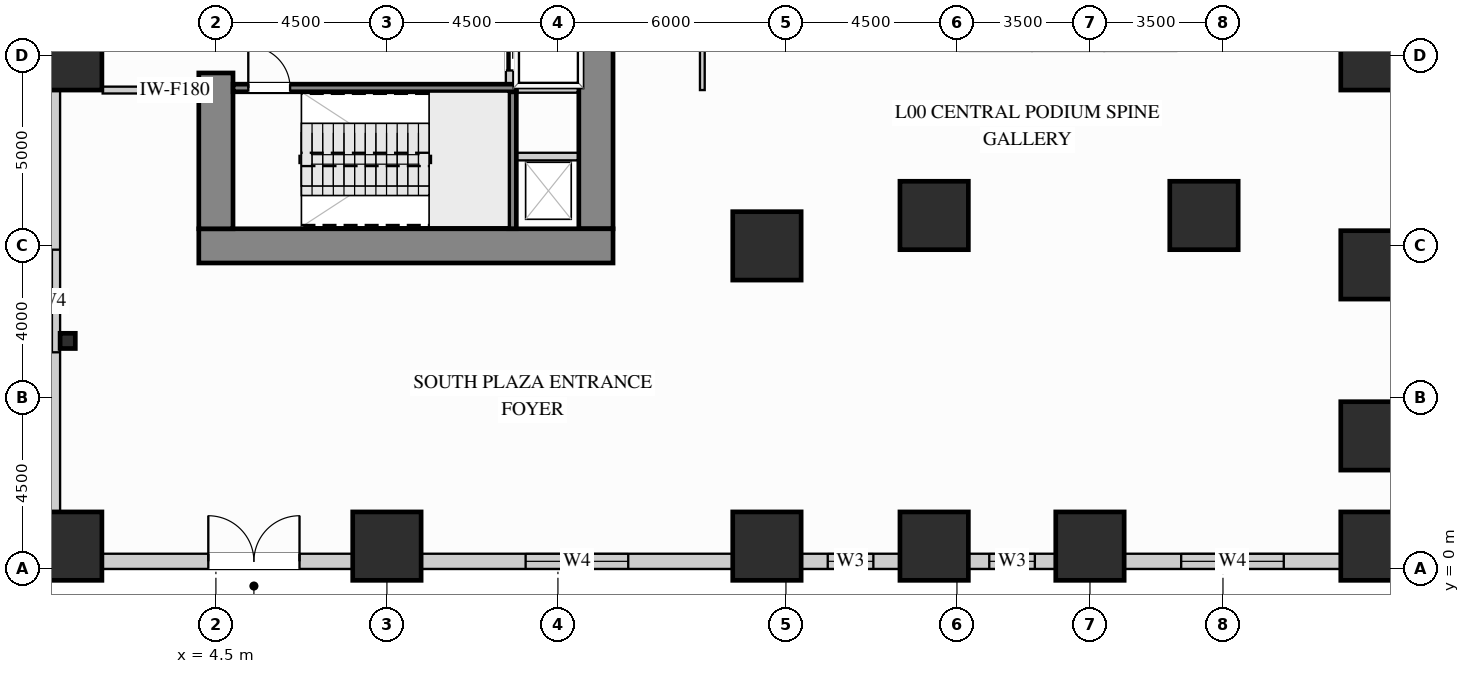
"""IFC4 building model, lengths in metres.
Left out: names, types, materials, properties, quantities, classifications, styles, units other than length and angle.
Written with IfcOpenShell. Run it as: python <this file> out.ifc"""

import sys

from ifc_helpers import new_model, si_unit, direction, frame, frame_2d, origin, origin_2d, place, context, subcontext, project, spatial, rectangle, hollow_rectangle, extrude, source, transform, mapped, element, fill, save


model = new_model("IFC4")
c1 = context("Model", 3, precision=1e-05, world=origin(), true_north=direction((0.0, 1.0)))
c2 = subcontext(c1, "Body", "Model", "MODEL_VIEW")
j1 = project(units=[si_unit("LENGTHUNIT", "METRE"), si_unit("PLANEANGLEUNIT", "RADIAN")], contexts=[c1])
p1 = place(None, origin())
s1 = spatial("IfcSite", under=j1, at=p1, CompositionType="ELEMENT")
p2 = place(p1, origin())
s2 = spatial("IfcBuilding", under=s1, at=p2, CompositionType="ELEMENT")
p3 = place(p2, origin())
s3 = spatial("IfcBuildingStorey", under=s2, at=p3, CompositionType="ELEMENT", Elevation=0.0)
m1 = source(origin(), c2, "Body", "SweptSolid", [
    extrude(rectangle(XDim=1.8, YDim=1.8, at=origin_2d()), origin(), (0.0, 0.0, 1.0), 4.25),
])
for number, where, z_axis, x_axis in (
    (1, (0.6, 0.6, 0.0), (0.0, 0.0, 1.0), (1.0, 0.0, 0.0)),
    (2, (0.6, 13.5, 0.0), (0.0, 0.0, 1.0), (1.0, 0.0, 0.0)),
    (3, (9.0, 0.6, 0.0), (0.0, 0.0, 1.0), (1.0, 0.0, 0.0)),
    (4, (19.0, 0.6, 0.0), (0.0, 0.0, 1.0), (1.0, 0.0, 0.0)),
    (5, (27.5, 0.6, 0.0), (0.0, 0.0, 1.0), (1.0, 0.0, 0.0)),
    (6, (35.0, 0.6, 0.0), (0.0, 0.0, 1.0), (1.0, 0.0, 0.0)),
    (7, (19.0, 8.5, 0.0), (0.0, 0.0, 1.0), (1.0, 0.0, 0.0)),
    (8, (35.0, 3.5, 0.0), (0.0, 0.0, 1.0), (1.0, 0.0, 0.0)),
    (9, (35.0, 8.0, 0.0), (0.0, 0.0, 1.0), (1.0, 0.0, 0.0)),
    (10, (35.0, 13.5, 0.0), (0.0, 0.0, 1.0), (1.0, 0.0, 0.0)),
    (11, (23.4, 0.6, 0.0), (0.0, 0.0, 1.0), (1.0, 0.0, 0.0)),
    (12, (23.4, 9.3, 0.0), (0.0, 0.0, 1.0), (1.0, 0.0, 0.0)),
    (13, (30.5, 9.3, 0.0), (0.0, 0.0, 1.0), (1.0, 0.0, 0.0)),
):
    element("IfcColumn", number, at=place(p3, frame(where, z_axis=z_axis, x_axis=x_axis)), inside=s3, PredefinedType="COLUMN", context=c2, shape_type="MappedRepresentation", body=[
        mapped(m1, transform((0.0, 0.0, 0.0), x_axis=(1.0, 0.0, 0.0), y_axis=(0.0, 1.0, 0.0), z_axis=(0.0, 0.0, 1.0))),
    ])
m2 = source(origin(), c2, "Body", "SweptSolid", [
    extrude(hollow_rectangle(XDim=0.4, YDim=0.4, WallThickness=0.02, at=origin_2d()), origin(), (0.0, 0.0, 1.0), 4.25),
])
p4 = place(p3, frame((0.6, 6.0, 0.0), z_axis=(0.0, 0.0, 1.0), x_axis=(1.0, 0.0, 0.0)))
e14 = element("IfcColumn", 14, at=p4, inside=s3, PredefinedType="PILASTER", context=c2, shape_type="MappedRepresentation", body=[
    mapped(m2, transform((0.0, 0.0, 0.0), x_axis=(1.0, 0.0, 0.0), y_axis=(0.0, 1.0, 0.0), z_axis=(0.0, 0.0, 1.0))),
])
m3 = source(origin(), c2, "Body", "SweptSolid", [
    extrude(rectangle(XDim=9.87, YDim=0.9, at=frame_2d((4.935, 0.0))), origin(), (0.0, 0.0, 1.0), 4.25),
])
p5 = place(p3, frame((14.5, 8.95, 0.0), z_axis=(0.0, 0.0, 1.0), x_axis=(0.0, 1.0, 0.0)))
e15 = element("IfcWall", 15, at=p5, inside=s3, PredefinedType="SHEAR", context=c2, shape_type="MappedRepresentation", body=[
    mapped(m3, transform((0.0, 0.0, 0.0), x_axis=(1.0, 0.0, 0.0), y_axis=(0.0, 1.0, 0.0), z_axis=(0.0, 0.0, 1.0))),
])
m4 = source(origin(), c2, "Body", "SweptSolid", [
    extrude(rectangle(XDim=10.9, YDim=0.9, at=frame_2d((5.45, 0.0))), origin(), (0.0, 0.0, 1.0), 4.25),
])
p6 = place(p3, frame((4.05, 8.5, 0.0), z_axis=(0.0, 0.0, 1.0), x_axis=(1.0, 0.0, 0.0)))
e16 = element("IfcWall", 16, at=p6, inside=s3, PredefinedType="SHEAR", context=c2, shape_type="MappedRepresentation", body=[
    mapped(m4, transform((0.0, 0.0, 0.0), x_axis=(1.0, 0.0, 0.0), y_axis=(0.0, 1.0, 0.0), z_axis=(0.0, 0.0, 1.0))),
])
m5 = source(origin(), c2, "Body", "SweptSolid", [
    extrude(rectangle(XDim=4.1, YDim=0.9, at=frame_2d((2.05, 0.0))), origin(), (0.0, 0.0, 1.0), 4.25),
])
p7 = place(p3, frame((4.5, 8.95, 0.0), z_axis=(0.0, 0.0, 1.0), x_axis=(0.0, 1.0, 0.0)))
e17 = element("IfcWall", 17, at=p7, inside=s3, PredefinedType="SHEAR", context=c2, shape_type="MappedRepresentation", body=[
    mapped(m5, transform((0.0, 0.0, 0.0), x_axis=(1.0, 0.0, 0.0), y_axis=(0.0, 1.0, 0.0), z_axis=(0.0, 0.0, 1.0))),
])
p8 = place(p3, frame((0.2, 12.602, 0.0), z_axis=(0.0, 0.0, 1.0), x_axis=(0.0, -1.0, 0.0)))
e18 = element("IfcWall", 18, at=p8, inside=s3, PredefinedType="SOLIDWALL", context=c2, shape_type="SweptSolid", body=[
    extrude(rectangle(XDim=11.104, YDim=0.4, at=frame_2d((5.552, 0.0))), origin(), (0.0, 0.0, 1.0), 3.135),
])
p9 = place(p8, frame((4.202, 0.0, 0.65)))
e19 = element("IfcOpeningElement", 19, at=p9, cuts=e18, PredefinedType="OPENING", context=c2, shape_type="SweptSolid", body=[
    extrude(rectangle(XDim=2.7, YDim=2.305, at=frame_2d((1.35, 1.152))), frame((0.0, 0.21, 0.0), z_axis=(0.0, -1.0, 0.0), x_axis=(1.0, 0.0, 0.0)), (0.0, 0.0, 1.0), 0.42),
])
p10 = place(p3, frame((1.498, 0.2, 0.0), z_axis=(0.0, 0.0, 1.0), x_axis=(1.0, 0.0, 0.0)))
e20 = element("IfcWall", 20, at=p10, inside=s3, PredefinedType="SOLIDWALL", context=c2, shape_type="SweptSolid", body=[
    extrude(rectangle(XDim=6.604, YDim=0.4, at=frame_2d((3.302, 0.0))), origin(), (0.0, 0.0, 1.0), 3.135),
])
p11 = place(p10, frame((2.802, 0.0, 0.0)))
e21 = element("IfcOpeningElement", 21, at=p11, cuts=e20, PredefinedType="OPENING", context=c2, shape_type="SweptSolid", body=[
    extrude(rectangle(XDim=2.4, YDim=2.6, at=frame_2d((1.2, 1.3))), frame((0.0, 0.21, 0.0), z_axis=(0.0, -1.0, 0.0), x_axis=(1.0, 0.0, 0.0)), (0.0, 0.0, 1.0), 0.42),
])
p12 = place(p3, frame((9.898, 0.2, 0.0), z_axis=(0.0, 0.0, 1.0), x_axis=(1.0, 0.0, 0.0)))
e22 = element("IfcWall", 22, at=p12, inside=s3, PredefinedType="SOLIDWALL", context=c2, shape_type="SweptSolid", body=[
    extrude(rectangle(XDim=8.204, YDim=0.4, at=frame_2d((4.102, 0.0))), origin(), (0.0, 0.0, 1.0), 3.135),
])
p13 = place(p12, frame((2.752, 0.0, 0.65)))
e23 = element("IfcOpeningElement", 23, at=p13, cuts=e22, PredefinedType="OPENING", context=c2, shape_type="SweptSolid", body=[
    extrude(rectangle(XDim=2.7, YDim=2.305, at=frame_2d((1.35, 1.152))), frame((0.0, 0.21, 0.0), z_axis=(0.0, -1.0, 0.0), x_axis=(1.0, 0.0, 0.0)), (0.0, 0.0, 1.0), 0.42),
])
p14 = place(p3, frame((19.898, 0.2, 0.0), z_axis=(0.0, 0.0, 1.0), x_axis=(1.0, 0.0, 0.0)))
e24 = element("IfcWall", 24, at=p14, inside=s3, PredefinedType="SOLIDWALL", context=c2, shape_type="SweptSolid", body=[
    extrude(rectangle(XDim=2.604, YDim=0.4, at=frame_2d((1.302, 0.0))), origin(), (0.0, 0.0, 1.0), 3.135),
])
p15 = place(p14, frame((0.702, 0.0, 0.65)))
e25 = element("IfcOpeningElement", 25, at=p15, cuts=e24, PredefinedType="OPENING", context=c2, shape_type="SweptSolid", body=[
    extrude(rectangle(XDim=1.2, YDim=2.305, at=frame_2d((0.6, 1.152))), frame((0.0, 0.21, 0.0), z_axis=(0.0, -1.0, 0.0), x_axis=(1.0, 0.0, 0.0)), (0.0, 0.0, 1.0), 0.42),
])
p16 = place(p3, frame((24.298, 0.2, 0.0), z_axis=(0.0, 0.0, 1.0), x_axis=(1.0, 0.0, 0.0)))
e26 = element("IfcWall", 26, at=p16, inside=s3, PredefinedType="SOLIDWALL", context=c2, shape_type="SweptSolid", body=[
    extrude(rectangle(XDim=2.304, YDim=0.4, at=frame_2d((1.152, 0.0))), origin(), (0.0, 0.0, 1.0), 3.135),
])
p17 = place(p16, frame((0.552, 0.0, 0.65)))
e27 = element("IfcOpeningElement", 27, at=p17, cuts=e26, PredefinedType="OPENING", context=c2, shape_type="SweptSolid", body=[
    extrude(rectangle(XDim=1.2, YDim=2.305, at=frame_2d((0.6, 1.152))), frame((0.0, 0.21, 0.0), z_axis=(0.0, -1.0, 0.0), x_axis=(1.0, 0.0, 0.0)), (0.0, 0.0, 1.0), 0.42),
])
p18 = place(p3, frame((28.398, 0.2, 0.0), z_axis=(0.0, 0.0, 1.0), x_axis=(1.0, 0.0, 0.0)))
e28 = element("IfcWall", 28, at=p18, inside=s3, PredefinedType="SOLIDWALL", context=c2, shape_type="SweptSolid", body=[
    extrude(rectangle(XDim=5.704, YDim=0.4, at=frame_2d((2.852, 0.0))), origin(), (0.0, 0.0, 1.0), 3.135),
])
p19 = place(p18, frame((1.502, 0.0, 0.65)))
e29 = element("IfcOpeningElement", 29, at=p19, cuts=e28, PredefinedType="OPENING", context=c2, shape_type="SweptSolid", body=[
    extrude(rectangle(XDim=2.7, YDim=2.305, at=frame_2d((1.35, 1.152))), frame((0.0, 0.21, 0.0), z_axis=(0.0, -1.0, 0.0), x_axis=(1.0, 0.0, 0.0)), (0.0, 0.0, 1.0), 0.42),
])
m6 = source(origin(), c2, "Body", "SweptSolid", [
    extrude(rectangle(XDim=2.5, YDim=0.18, at=frame_2d((1.25, 0.0))), origin(), (0.0, 0.0, 1.0), 4.235),
])
p20 = place(p3, frame((1.52, 12.6, 0.0), z_axis=(0.0, 0.0, 1.0), x_axis=(1.0, 0.0, 0.0)))
e30 = element("IfcWall", 30, at=p20, inside=s3, PredefinedType="PARTITIONING", context=c2, shape_type="MappedRepresentation", body=[
    mapped(m6, transform((0.0, 0.0, 0.0), x_axis=(1.0, 0.0, 0.0), y_axis=(0.0, 1.0, 0.0), z_axis=(0.0, 0.0, 1.0))),
])
p21 = place(p3, frame((17.3, 12.6, 0.0), z_axis=(0.0, 0.0, 1.0), x_axis=(0.0, 1.0, 0.0)))
e31 = element("IfcWall", 31, at=p21, inside=s3, PredefinedType="PARTITIONING", context=c2, shape_type="SweptSolid", body=[
    extrude(rectangle(XDim=6.0, YDim=0.125, at=frame_2d((3.0, 0.0))), origin(), (0.0, 0.0, 1.0), 4.235),
])
p22 = place(p21, frame((2.525, 0.0, 0.0)))
e32 = element("IfcOpeningElement", 32, at=p22, cuts=e31, PredefinedType="OPENING", context=c2, shape_type="SweptSolid", body=[
    extrude(rectangle(XDim=0.95, YDim=2.15, at=frame_2d((0.475, 1.075))), frame((0.0, 0.073, 0.0), z_axis=(0.0, -1.0, 0.0), x_axis=(1.0, 0.0, 0.0)), (0.0, 0.0, 1.0), 0.145),
])
m7 = source(origin(), c2, "Body", "SweptSolid", [
    extrude(rectangle(XDim=1.6, YDim=0.2, at=frame_2d((0.8, 0.0))), origin(), (0.0, 0.0, 1.0), 4.235),
])
p23 = place(p3, frame((12.42, 10.85, 0.0), z_axis=(0.0, 0.0, 1.0), x_axis=(1.0, 0.0, 0.0)))
e33 = element("IfcWall", 33, at=p23, inside=s3, PredefinedType="PARTITIONING", context=c2, shape_type="MappedRepresentation", body=[
    mapped(m7, transform((0.0, 0.0, 0.0), x_axis=(1.0, 0.0, 0.0), y_axis=(0.0, 1.0, 0.0), z_axis=(0.0, 0.0, 1.0))),
])
m8 = source(origin(), c2, "Body", "SweptSolid", [
    extrude(rectangle(XDim=1.79, YDim=0.2, at=frame_2d((0.895, 0.0))), origin(), (0.0, 0.0, 1.0), 4.235),
])
p24 = place(p3, frame((12.23, 12.63, 0.0), z_axis=(0.0, 0.0, 1.0), x_axis=(1.0, 0.0, 0.0)))
e34 = element("IfcWall", 34, at=p24, inside=s3, PredefinedType="PARTITIONING", context=c2, shape_type="MappedRepresentation", body=[
    mapped(m8, transform((0.0, 0.0, 0.0), x_axis=(1.0, 0.0, 0.0), y_axis=(0.0, 1.0, 0.0), z_axis=(0.0, 0.0, 1.0))),
])
p25 = place(p3, frame((12.23, 12.63, 0.0), z_axis=(0.0, 0.0, 1.0), x_axis=(0.0, 1.0, 0.0)))
e35 = element("IfcWall", 35, at=p25, inside=s3, PredefinedType="PARTITIONING", context=c2, shape_type="SweptSolid", body=[
    extrude(rectangle(XDim=2.07, YDim=0.2, at=frame_2d((1.035, 0.0))), origin(), (0.0, 0.0, 1.0), 4.235),
])
p26 = place(p25, frame((0.485, 0.0, 0.0)))
e36 = element("IfcOpeningElement", 36, at=p26, cuts=e35, PredefinedType="OPENING", context=c2, shape_type="SweptSolid", body=[
    extrude(rectangle(XDim=1.1, YDim=2.2, at=frame_2d((0.55, 1.1))), frame((0.0, 0.11, 0.0), z_axis=(0.0, -1.0, 0.0), x_axis=(1.0, 0.0, 0.0)), (0.0, 0.0, 1.0), 0.22),
])
m9 = source(origin(), c2, "Body", "SweptSolid", [
    extrude(rectangle(XDim=3.603, YDim=0.2, at=frame_2d((1.802, 0.0))), origin(), (0.0, 0.0, 1.0), 4.25),
])
p27 = place(p3, frame((12.305, 8.952, 0.0), z_axis=(0.0, 0.0, 1.0), x_axis=(0.0, 1.0, 0.0)))
e37 = element("IfcWall", 37, at=p27, inside=s3, PredefinedType="SHEAR", context=c2, shape_type="MappedRepresentation", body=[
    mapped(m9, transform((0.0, 0.0, 0.0), x_axis=(1.0, 0.0, 0.0), y_axis=(0.0, 1.0, 0.0), z_axis=(0.0, 0.0, 1.0))),
])
p28 = place(p3, frame((4.952, 12.655, 0.0), z_axis=(0.0, 0.0, 1.0), x_axis=(1.0, 0.0, 0.0)))
e38 = element("IfcWall", 38, at=p28, inside=s3, PredefinedType="SHEAR", context=c2, shape_type="SweptSolid", body=[
    extrude(rectangle(XDim=7.453, YDim=0.2, at=frame_2d((3.727, 0.0))), origin(), (0.0, 0.0, 1.0), 4.25),
])
p29 = place(p28, frame((0.4, 0.0, 0.0)))
e39 = element("IfcOpeningElement", 39, at=p29, cuts=e38, PredefinedType="OPENING", context=c2, shape_type="SweptSolid", body=[
    extrude(rectangle(XDim=1.1, YDim=2.15, at=frame_2d((0.55, 1.075))), frame((0.0, 0.11, 0.0), z_axis=(0.0, -1.0, 0.0), x_axis=(1.0, 0.0, 0.0)), (0.0, 0.0, 1.0), 0.22),
])
m10 = source(origin(), c2, "Body", "SweptSolid", [
    extrude(rectangle(XDim=2.4, YDim=2.6, at=frame_2d((1.2, 1.3))), frame((0.0, 0.025, 0.0), z_axis=(0.0, -1.0, 0.0), x_axis=(1.0, 0.0, 0.0)), (0.0, 0.0, 1.0), 0.05),
])
p30 = place(p11, origin())
e40 = element("IfcDoor", 40, at=p30, inside=s3, OperationType="DOUBLE_SWING_LEFT", PredefinedType="DOOR", context=c2, shape_type="MappedRepresentation", body=[
    mapped(m10, transform((0.0, 0.0, 0.0), x_axis=(1.0, 0.0, 0.0), y_axis=(0.0, 1.0, 0.0), z_axis=(0.0, 0.0, 1.0))),
])
fill(e21, e40)
m11 = source(origin(), c2, "Body", "SweptSolid", [
    extrude(rectangle(XDim=1.1, YDim=2.2, at=frame_2d((0.55, 1.1))), frame((0.0, 0.025, 0.0), z_axis=(0.0, -1.0, 0.0), x_axis=(1.0, 0.0, 0.0)), (0.0, 0.0, 1.0), 0.05),
])
p31 = place(p26, origin())
e41 = element("IfcDoor", 41, at=p31, inside=s3, OperationType="SLIDING_TO_LEFT", PredefinedType="DOOR", context=c2, shape_type="MappedRepresentation", body=[
    mapped(m11, transform((0.0, 0.0, 0.0), x_axis=(1.0, 0.0, 0.0), y_axis=(0.0, 1.0, 0.0), z_axis=(0.0, 0.0, 1.0))),
])
fill(e36, e41)
m12 = source(origin(), c2, "Body", "SweptSolid", [
    extrude(rectangle(XDim=1.1, YDim=2.15, at=frame_2d((0.55, 1.075))), frame((0.0, 0.025, 0.0), z_axis=(0.0, -1.0, 0.0), x_axis=(1.0, 0.0, 0.0)), (0.0, 0.0, 1.0), 0.05),
])
p32 = place(p29, origin())
e42 = element("IfcDoor", 42, at=p32, inside=s3, OperationType="SINGLE_SWING_LEFT", PredefinedType="DOOR", context=c2, shape_type="MappedRepresentation", body=[
    mapped(m12, transform((0.0, 0.0, 0.0), x_axis=(1.0, 0.0, 0.0), y_axis=(0.0, 1.0, 0.0), z_axis=(0.0, 0.0, 1.0))),
])
fill(e39, e42)
m13 = source(origin(), c2, "Body", "SweptSolid", [
    extrude(rectangle(XDim=1.2, YDim=2.305, at=frame_2d((0.6, 1.152))), frame((0.0, 0.03, 0.0), z_axis=(0.0, -1.0, 0.0), x_axis=(1.0, 0.0, 0.0)), (0.0, 0.0, 1.0), 0.06),
])
p33 = place(p15, origin())
e43 = element("IfcWindow", 43, at=p33, inside=s3, PartitioningType="SINGLE_PANEL", PredefinedType="WINDOW", context=c2, shape_type="MappedRepresentation", body=[
    mapped(m13, transform((0.0, 0.0, 0.0), x_axis=(1.0, 0.0, 0.0), y_axis=(0.0, 1.0, 0.0), z_axis=(0.0, 0.0, 1.0))),
])
fill(e25, e43)
p34 = place(p17, origin())
e44 = element("IfcWindow", 44, at=p34, inside=s3, PartitioningType="SINGLE_PANEL", PredefinedType="WINDOW", context=c2, shape_type="MappedRepresentation", body=[
    mapped(m13, transform((0.0, 0.0, 0.0), x_axis=(1.0, 0.0, 0.0), y_axis=(0.0, 1.0, 0.0), z_axis=(0.0, 0.0, 1.0))),
])
fill(e27, e44)
m14 = source(origin(), c2, "Body", "SweptSolid", [
    extrude(rectangle(XDim=2.7, YDim=2.305, at=frame_2d((1.35, 1.152))), frame((0.0, 0.03, 0.0), z_axis=(0.0, -1.0, 0.0), x_axis=(1.0, 0.0, 0.0)), (0.0, 0.0, 1.0), 0.06),
])
p35 = place(p9, origin())
e45 = element("IfcWindow", 45, at=p35, inside=s3, PartitioningType="SINGLE_PANEL", PredefinedType="WINDOW", context=c2, shape_type="MappedRepresentation", body=[
    mapped(m14, transform((0.0, 0.0, 0.0), x_axis=(1.0, 0.0, 0.0), y_axis=(0.0, 1.0, 0.0), z_axis=(0.0, 0.0, 1.0))),
])
fill(e19, e45)
p36 = place(p13, origin())
e46 = element("IfcWindow", 46, at=p36, inside=s3, PartitioningType="SINGLE_PANEL", PredefinedType="WINDOW", context=c2, shape_type="MappedRepresentation", body=[
    mapped(m14, transform((0.0, 0.0, 0.0), x_axis=(1.0, 0.0, 0.0), y_axis=(0.0, 1.0, 0.0), z_axis=(0.0, 0.0, 1.0))),
])
fill(e23, e46)
p37 = place(p19, origin())
e47 = element("IfcWindow", 47, at=p37, inside=s3, PartitioningType="SINGLE_PANEL", PredefinedType="WINDOW", context=c2, shape_type="MappedRepresentation", body=[
    mapped(m14, transform((0.0, 0.0, 0.0), x_axis=(1.0, 0.0, 0.0), y_axis=(0.0, 1.0, 0.0), z_axis=(0.0, 0.0, 1.0))),
])
fill(e29, e47)
save(model, sys.argv[1])
